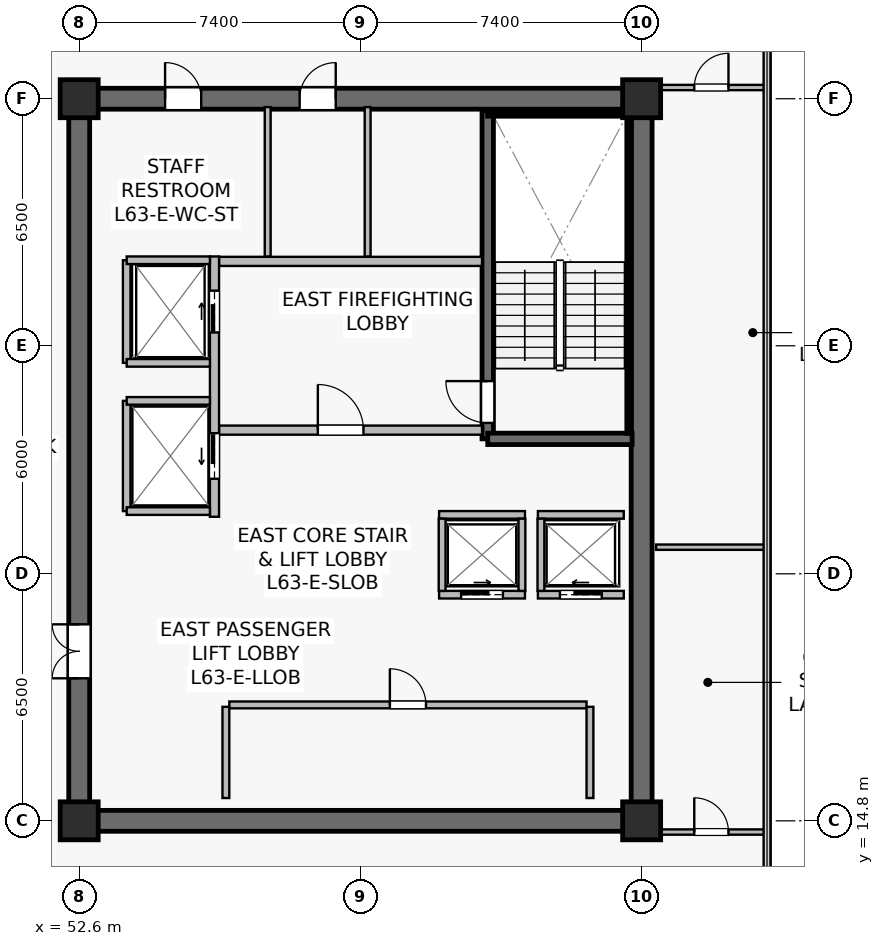
"""IFC4 building model, lengths in metres.
Left out: names, types, materials, properties, quantities, classifications, styles, units other than length and angle.
Written with IfcOpenShell. Run it as: python <this file> out.ifc"""

import sys

from ifc_helpers import new_model, si_unit, direction, frame, frame_2d, origin, origin_2d, place, context, subcontext, project, spatial, rectangle, extrude, source, transform, mapped, element, fill, save


model = new_model("IFC4")
c1 = context("Model", 3, precision=1e-05, world=origin(), true_north=direction((0.0, 1.0)))
c2 = subcontext(c1, "Body", "Model", "MODEL_VIEW")
j1 = project(units=[si_unit("LENGTHUNIT", "METRE"), si_unit("PLANEANGLEUNIT", "RADIAN")], contexts=[c1])
p1 = place(None, origin())
s1 = spatial("IfcSite", under=j1, at=p1, CompositionType="ELEMENT")
p2 = place(p1, origin())
s2 = spatial("IfcBuilding", under=s1, at=p2, CompositionType="ELEMENT")
p3 = place(p2, frame((0.0, 0.0, 262.9)))
s3 = spatial("IfcBuildingStorey", under=s2, at=p3, CompositionType="ELEMENT", Elevation=262.9)
p4 = place(p3, frame((52.325, 14.8, 0.0), z_axis=(0.0, 0.0, 1.0), x_axis=(1.0, 0.0, 0.0)))
e1 = element("IfcWall", 1, at=p4, inside=s3, PredefinedType="SHEAR", context=c2, shape_type="SweptSolid", body=[
    extrude(rectangle(XDim=15.35, YDim=0.55, at=frame_2d((7.675, 0.0))), origin(), (0.0, 0.0, 1.0), 3.8),
])
p5 = place(p3, frame((52.325, 33.8, 0.0), z_axis=(0.0, 0.0, 1.0), x_axis=(1.0, 0.0, 0.0)))
e2 = element("IfcWall", 2, at=p5, inside=s3, PredefinedType="SHEAR", context=c2, shape_type="SweptSolid", body=[
    extrude(rectangle(XDim=15.35, YDim=0.55, at=frame_2d((7.675, 0.0))), origin(), (0.0, 0.0, 1.0), 3.8),
])
p6 = place(p5, frame((6.075, 0.0, 0.0)))
e3 = element("IfcOpeningElement", 3, at=p6, cuts=e2, PredefinedType="OPENING", context=c2, shape_type="SweptSolid", body=[
    extrude(rectangle(XDim=0.95, YDim=2.15, at=frame_2d((0.475, 1.075))), frame((0.0, 0.285, 0.0), z_axis=(0.0, -1.0, 0.0), x_axis=(1.0, 0.0, 0.0)), (0.0, 0.0, 1.0), 0.57),
])
p7 = place(p5, frame((2.535, 0.0, 0.0)))
e4 = element("IfcOpeningElement", 4, at=p7, cuts=e2, PredefinedType="OPENING", context=c2, shape_type="SweptSolid", body=[
    extrude(rectangle(XDim=0.95, YDim=2.15, at=frame_2d((0.475, 1.075))), frame((0.0, 0.285, 0.0), z_axis=(0.0, -1.0, 0.0), x_axis=(1.0, 0.0, 0.0)), (0.0, 0.0, 1.0), 0.57),
])
p8 = place(p3, frame((52.6, 15.075, 0.0), z_axis=(0.0, 0.0, 1.0), x_axis=(0.0, 1.0, 0.0)))
e5 = element("IfcWall", 5, at=p8, inside=s3, PredefinedType="SHEAR", context=c2, shape_type="SweptSolid", body=[
    extrude(rectangle(XDim=18.45, YDim=0.55, at=frame_2d((9.225, 0.0))), origin(), (0.0, 0.0, 1.0), 3.8),
])
p9 = place(p8, frame((3.475, 0.0, 0.0)))
e6 = element("IfcOpeningElement", 6, at=p9, cuts=e5, PredefinedType="OPENING", context=c2, shape_type="SweptSolid", body=[
    extrude(rectangle(XDim=1.42, YDim=2.2, at=frame_2d((0.71, 1.1))), frame((0.0, 0.285, 0.0), z_axis=(0.0, -1.0, 0.0), x_axis=(1.0, 0.0, 0.0)), (0.0, 0.0, 1.0), 0.57),
])
p10 = place(p3, frame((67.4, 15.075, 0.0), z_axis=(0.0, 0.0, 1.0), x_axis=(0.0, 1.0, 0.0)))
e7 = element("IfcWall", 7, at=p10, inside=s3, PredefinedType="SHEAR", context=c2, shape_type="SweptSolid", body=[
    extrude(rectangle(XDim=18.45, YDim=0.55, at=frame_2d((9.225, 0.0))), origin(), (0.0, 0.0, 1.0), 3.8),
])
p11 = place(p3, frame((63.35, 24.85, 0.0), z_axis=(0.0, 0.0, 1.0), x_axis=(0.0, 1.0, 0.0)))
e8 = element("IfcWall", 8, at=p11, inside=s3, PredefinedType="SHEAR", context=c2, shape_type="SweptSolid", body=[
    extrude(rectangle(XDim=8.63, YDim=0.3, at=frame_2d((4.315, 0.0))), origin(), (0.0, 0.0, 1.0), 3.8),
])
p12 = place(p11, frame((0.42, 0.0, 0.0)))
e9 = element("IfcOpeningElement", 9, at=p12, cuts=e8, PredefinedType="OPENING", context=c2, shape_type="SweptSolid", body=[
    extrude(rectangle(XDim=1.1, YDim=2.15, at=frame_2d((0.55, 1.075))), frame((0.0, 0.16, 0.0), z_axis=(0.0, -1.0, 0.0), x_axis=(1.0, 0.0, 0.0)), (0.0, 0.0, 1.0), 0.32),
])
p13 = place(p3, frame((63.35, 24.85, 0.0), z_axis=(0.0, 0.0, 1.0), x_axis=(1.0, 0.0, 0.0)))
e10 = element("IfcWall", 10, at=p13, inside=s3, PredefinedType="SHEAR", context=c2, shape_type="SweptSolid", body=[
    extrude(rectangle(XDim=3.8, YDim=0.3, at=frame_2d((1.9, 0.0))), origin(), (0.0, 0.0, 1.0), 3.8),
])
p14 = place(p3, frame((63.35, 33.4, 0.0), z_axis=(0.0, 0.0, 1.0), x_axis=(1.0, 0.0, 0.0)))
e11 = element("IfcWall", 11, at=p14, inside=s3, PredefinedType="SOLIDWALL", context=c2, shape_type="SweptSolid", body=[
    extrude(rectangle(XDim=3.72, YDim=0.12, at=frame_2d((1.86, 0.0))), origin(), (0.0, 0.0, 1.0), 3.8),
])
p15 = place(p3, frame((67.07, 25.0, 0.0), z_axis=(0.0, 0.0, 1.0), x_axis=(0.0, 1.0, 0.0)))
e12 = element("IfcWall", 12, at=p15, inside=s3, PredefinedType="SOLIDWALL", context=c2, shape_type="SweptSolid", body=[
    extrude(rectangle(XDim=8.32, YDim=0.12, at=frame_2d((4.16, 0.0))), origin(), (0.0, 0.0, 1.0), 3.8),
])
m1 = source(origin(), c2, "Body", "SweptSolid", [
    extrude(rectangle(XDim=1.0, YDim=1.0, at=origin_2d()), origin(), (0.0, 0.0, 1.0), 4.1),
])
for number, where, z_axis, x_axis in (
    (13, (52.6, 14.8, 0.0), (0.0, 0.0, 1.0), (1.0, 0.0, 0.0)),
    (14, (67.4, 14.8, 0.0), (0.0, 0.0, 1.0), (1.0, 0.0, 0.0)),
    (15, (52.6, 33.8, 0.0), (0.0, 0.0, 1.0), (1.0, 0.0, 0.0)),
    (16, (67.4, 33.8, 0.0), (0.0, 0.0, 1.0), (1.0, 0.0, 0.0)),
):
    element("IfcColumn", number, at=place(p3, frame(where, z_axis=z_axis, x_axis=x_axis)), inside=s3, PredefinedType="COLUMN", context=c2, shape_type="MappedRepresentation", body=[
        mapped(m1, transform((0.0, 0.0, 0.0), scale=1.0)),
    ])
p16 = place(p3, frame((56.28, 25.08, 0.0), z_axis=(0.0, 0.0, 1.0), x_axis=(1.0, 0.0, 0.0)))
e17 = element("IfcWall", 17, at=p16, inside=s3, PredefinedType="SOLIDWALL", context=c2, shape_type="SweptSolid", body=[
    extrude(rectangle(XDim=6.92, YDim=0.24, at=frame_2d((3.46, 0.0))), origin(), (0.0, 0.0, 1.0), 3.197),
])
p17 = place(p16, frame((2.6, 0.0, 0.0)))
e18 = element("IfcOpeningElement", 18, at=p17, cuts=e17, PredefinedType="OPENING", context=c2, shape_type="SweptSolid", body=[
    extrude(rectangle(XDim=1.2, YDim=2.16, at=frame_2d((0.6, 1.08))), frame((0.0, 0.13, 0.0), z_axis=(0.0, -1.0, 0.0), x_axis=(1.0, 0.0, 0.0)), (0.0, 0.0, 1.0), 0.26),
])
p18 = place(p3, frame((56.28, 29.52, 0.0), z_axis=(0.0, 0.0, 1.0), x_axis=(1.0, 0.0, 0.0)))
e19 = element("IfcWall", 19, at=p18, inside=s3, PredefinedType="SOLIDWALL", context=c2, shape_type="SweptSolid", body=[
    extrude(rectangle(XDim=6.92, YDim=0.24, at=frame_2d((3.46, 0.0))), origin(), (0.0, 0.0, 1.0), 3.197),
])
p19 = place(p3, frame((56.16, 22.8, 0.0), z_axis=(0.0, 0.0, 1.0), x_axis=(0.0, 1.0, 0.0)))
e20 = element("IfcWall", 20, at=p19, inside=s3, PredefinedType="SOLIDWALL", context=c2, shape_type="SweptSolid", body=[
    extrude(rectangle(XDim=6.85, YDim=0.24, at=frame_2d((3.425, 0.0))), origin(), (0.0, 0.0, 1.0), 2.935),
])
p20 = place(p19, frame((4.85, 0.0, 0.0)))
e21 = element("IfcOpeningElement", 21, at=p20, cuts=e20, PredefinedType="OPENING", context=c2, shape_type="SweptSolid", body=[
    extrude(rectangle(XDim=1.1, YDim=2.22, at=frame_2d((0.55, 1.11))), frame((0.0, 0.13, 0.0), z_axis=(0.0, -1.0, 0.0), x_axis=(1.0, 0.0, 0.0)), (0.0, 0.0, 1.0), 0.26),
])
p21 = place(p19, frame((1.0, 0.0, 0.0)))
e22 = element("IfcOpeningElement", 22, at=p21, cuts=e20, PredefinedType="OPENING", context=c2, shape_type="SweptSolid", body=[
    extrude(rectangle(XDim=1.2, YDim=2.22, at=frame_2d((0.6, 1.11))), frame((0.0, 0.13, 0.0), z_axis=(0.0, -1.0, 0.0), x_axis=(1.0, 0.0, 0.0)), (0.0, 0.0, 1.0), 0.26),
])
p22 = place(p3, frame((64.67, 20.75, 0.0), z_axis=(0.0, 0.0, 1.0), x_axis=(1.0, 0.0, 0.0)))
e23 = element("IfcWall", 23, at=p22, inside=s3, PredefinedType="SOLIDWALL", context=c2, shape_type="SweptSolid", body=[
    extrude(rectangle(XDim=2.26, YDim=0.2, at=frame_2d((1.13, 0.0))), origin(), (0.0, 0.0, 1.0), 3.8),
])
p23 = place(p22, frame((0.58, 0.0, 0.0)))
e24 = element("IfcOpeningElement", 24, at=p23, cuts=e23, PredefinedType="OPENING", context=c2, shape_type="SweptSolid", body=[
    extrude(rectangle(XDim=1.1, YDim=2.22, at=frame_2d((0.55, 1.11))), frame((0.0, 0.11, 0.0), z_axis=(0.0, -1.0, 0.0), x_axis=(1.0, 0.0, 0.0)), (0.0, 0.0, 1.0), 0.22),
])
p24 = place(p3, frame((64.67, 22.85, 0.0), z_axis=(0.0, 0.0, 1.0), x_axis=(1.0, 0.0, 0.0)))
e25 = element("IfcWall", 25, at=p24, inside=s3, PredefinedType="SOLIDWALL", context=c2, shape_type="SweptSolid", body=[
    extrude(rectangle(XDim=2.26, YDim=0.2, at=frame_2d((1.13, 0.0))), origin(), (0.0, 0.0, 1.0), 3.8),
])
p25 = place(p3, frame((64.75, 20.85, 0.0), z_axis=(0.0, 0.0, 1.0), x_axis=(0.0, 1.0, 0.0)))
e26 = element("IfcWall", 26, at=p25, inside=s3, PredefinedType="SOLIDWALL", context=c2, shape_type="SweptSolid", body=[
    extrude(rectangle(XDim=1.9, YDim=0.18, at=frame_2d((0.95, 0.0))), origin(), (0.0, 0.0, 1.0), 3.8),
])
p26 = place(p3, frame((62.07, 20.75, 0.0), z_axis=(0.0, 0.0, 1.0), x_axis=(1.0, 0.0, 0.0)))
e27 = element("IfcWall", 27, at=p26, inside=s3, PredefinedType="SOLIDWALL", context=c2, shape_type="SweptSolid", body=[
    extrude(rectangle(XDim=2.26, YDim=0.2, at=frame_2d((1.13, 0.0))), origin(), (0.0, 0.0, 1.0), 3.8),
])
p27 = place(p26, frame((0.58, 0.0, 0.0)))
e28 = element("IfcOpeningElement", 28, at=p27, cuts=e27, PredefinedType="OPENING", context=c2, shape_type="SweptSolid", body=[
    extrude(rectangle(XDim=1.1, YDim=2.22, at=frame_2d((0.55, 1.11))), frame((0.0, 0.11, 0.0), z_axis=(0.0, -1.0, 0.0), x_axis=(1.0, 0.0, 0.0)), (0.0, 0.0, 1.0), 0.22),
])
p28 = place(p3, frame((62.07, 22.85, 0.0), z_axis=(0.0, 0.0, 1.0), x_axis=(1.0, 0.0, 0.0)))
e29 = element("IfcWall", 29, at=p28, inside=s3, PredefinedType="SOLIDWALL", context=c2, shape_type="SweptSolid", body=[
    extrude(rectangle(XDim=2.26, YDim=0.2, at=frame_2d((1.13, 0.0))), origin(), (0.0, 0.0, 1.0), 3.8),
])
for number, where, z_axis, x_axis in (
    (30, (62.15, 20.85, 0.0), (0.0, 0.0, 1.0), (0.0, 1.0, 0.0)),
    (31, (64.25, 20.85, 0.0), (0.0, 0.0, 1.0), (0.0, 1.0, 0.0)),
):
    element("IfcWall", number, at=place(p3, frame(where, z_axis=z_axis, x_axis=x_axis)), inside=s3, PredefinedType="SOLIDWALL", context=c2, shape_type="SweptSolid", body=[
        extrude(rectangle(XDim=1.9, YDim=0.18, at=frame_2d((0.95, 0.0))), origin(), (0.0, 0.0, 1.0), 3.8),
    ])
p29 = place(p3, frame((53.85, 26.85, 0.0), z_axis=(0.0, 0.0, 1.0), x_axis=(0.0, 1.0, 0.0)))
e32 = element("IfcWall", 32, at=p29, inside=s3, PredefinedType="SOLIDWALL", context=c2, shape_type="SweptSolid", body=[
    extrude(rectangle(XDim=2.7, YDim=0.2, at=frame_2d((1.35, 0.0))), origin(), (0.0, 0.0, 1.0), 3.8),
])
p30 = place(p3, frame((53.85, 29.55, 0.0), z_axis=(0.0, 0.0, 1.0), x_axis=(1.0, 0.0, 0.0)))
e33 = element("IfcWall", 33, at=p30, inside=s3, PredefinedType="SOLIDWALL", context=c2, shape_type="SweptSolid", body=[
    extrude(rectangle(XDim=2.19, YDim=0.2, at=frame_2d((1.095, 0.0))), origin(), (0.0, 0.0, 1.0), 3.8),
])
p31 = place(p3, frame((53.85, 26.85, 0.0), z_axis=(0.0, 0.0, 1.0), x_axis=(1.0, 0.0, 0.0)))
e34 = element("IfcWall", 34, at=p31, inside=s3, PredefinedType="SOLIDWALL", context=c2, shape_type="SweptSolid", body=[
    extrude(rectangle(XDim=2.19, YDim=0.2, at=frame_2d((1.095, 0.0))), origin(), (0.0, 0.0, 1.0), 3.197),
])
p32 = place(p3, frame((53.85, 22.95, 0.0), z_axis=(0.0, 0.0, 1.0), x_axis=(0.0, 1.0, 0.0)))
e35 = element("IfcWall", 35, at=p32, inside=s3, PredefinedType="SOLIDWALL", context=c2, shape_type="SweptSolid", body=[
    extrude(rectangle(XDim=2.9, YDim=0.2, at=frame_2d((1.45, 0.0))), origin(), (0.0, 0.0, 1.0), 2.935),
])
for number, where, z_axis, x_axis in (
    (36, (53.85, 25.85, 0.0), (0.0, 0.0, 1.0), (1.0, 0.0, 0.0)),
    (37, (53.85, 22.95, 0.0), (0.0, 0.0, 1.0), (1.0, 0.0, 0.0)),
):
    element("IfcWall", number, at=place(p3, frame(where, z_axis=z_axis, x_axis=x_axis)), inside=s3, PredefinedType="SOLIDWALL", context=c2, shape_type="SweptSolid", body=[
        extrude(rectangle(XDim=2.19, YDim=0.2, at=frame_2d((1.095, 0.0))), origin(), (0.0, 0.0, 1.0), 3.8),
    ])
p33 = place(p3, frame((56.55, 17.85, 0.0), z_axis=(0.0, 0.0, 1.0), x_axis=(1.0, 0.0, 0.0)))
e38 = element("IfcWall", 38, at=p33, inside=s3, PredefinedType="SOLIDWALL", context=c2, shape_type="SweptSolid", body=[
    extrude(rectangle(XDim=9.4, YDim=0.18, at=frame_2d((4.7, 0.0))), origin(), (0.0, 0.0, 1.0), 3.197),
])
p34 = place(p33, frame((4.225, 0.0, 0.0)))
e39 = element("IfcOpeningElement", 39, at=p34, cuts=e38, PredefinedType="OPENING", context=c2, shape_type="SweptSolid", body=[
    extrude(rectangle(XDim=0.95, YDim=2.15, at=frame_2d((0.475, 1.075))), frame((0.0, 0.1, 0.0), z_axis=(0.0, -1.0, 0.0), x_axis=(1.0, 0.0, 0.0)), (0.0, 0.0, 1.0), 0.2),
])
for number, where, z_axis, x_axis in (
    (40, (56.46, 15.4, 0.0), (0.0, 0.0, 1.0), (0.0, 1.0, 0.0)),
    (41, (66.04, 15.4, 0.0), (0.0, 0.0, 1.0), (0.0, 1.0, 0.0)),
):
    element("IfcWall", number, at=place(p3, frame(where, z_axis=z_axis, x_axis=x_axis)), inside=s3, PredefinedType="SOLIDWALL", context=c2, shape_type="SweptSolid", body=[
        extrude(rectangle(XDim=2.4, YDim=0.18, at=frame_2d((1.2, 0.0))), origin(), (0.0, 0.0, 1.0), 3.8),
    ])
p35 = place(p3, frame((60.19, 29.65, 0.0), z_axis=(0.0, 0.0, 1.0), x_axis=(0.0, 1.0, 0.0)))
e42 = element("IfcWall", 42, at=p35, inside=s3, PredefinedType="PLUMBINGWALL", context=c2, shape_type="SweptSolid", body=[
    extrude(rectangle(XDim=3.93, YDim=0.155, at=frame_2d((1.965, 0.0))), origin(), (0.0, 0.0, 1.0), 3.197),
])
p36 = place(p3, frame((57.56, 29.65, 0.0), z_axis=(0.0, 0.0, 1.0), x_axis=(0.0, 1.0, 0.0)))
e43 = element("IfcWall", 43, at=p36, inside=s3, PredefinedType="PLUMBINGWALL", context=c2, shape_type="SweptSolid", body=[
    extrude(rectangle(XDim=3.93, YDim=0.155, at=frame_2d((1.965, 0.0))), origin(), (0.0, 0.0, 1.0), 3.8),
])
p37 = place(p3, frame((67.78, 22.0, 0.0), z_axis=(0.0, 0.0, 1.0), x_axis=(1.0, 0.0, 0.0)))
e44 = element("IfcWall", 44, at=p37, inside=s3, PredefinedType="PARTITIONING", context=c2, shape_type="SweptSolid", body=[
    extrude(rectangle(XDim=2.91, YDim=0.14, at=frame_2d((1.455, 0.0))), origin(), (0.0, 0.0, 1.0), 3.8),
])
p38 = place(p3, frame((67.78, 14.505, 0.0), z_axis=(0.0, 0.0, 1.0), x_axis=(1.0, 0.0, 0.0)))
e45 = element("IfcWall", 45, at=p38, inside=s3, PredefinedType="PARTITIONING", context=c2, shape_type="SweptSolid", body=[
    extrude(rectangle(XDim=2.91, YDim=0.14, at=frame_2d((1.455, 0.0))), origin(), (0.0, 0.0, 1.0), 3.8),
])
p39 = place(p38, frame((1.005, 0.0, 0.0)))
e46 = element("IfcOpeningElement", 46, at=p39, cuts=e45, PredefinedType="OPENING", context=c2, shape_type="SweptSolid", body=[
    extrude(rectangle(XDim=0.9, YDim=2.1, at=frame_2d((0.45, 1.05))), frame((0.0, 0.08, 0.0), z_axis=(0.0, -1.0, 0.0), x_axis=(1.0, 0.0, 0.0)), (0.0, 0.0, 1.0), 0.16),
])
p40 = place(p3, frame((67.78, 34.095, 0.0), z_axis=(0.0, 0.0, 1.0), x_axis=(1.0, 0.0, 0.0)))
e47 = element("IfcWall", 47, at=p40, inside=s3, PredefinedType="PARTITIONING", context=c2, shape_type="SweptSolid", body=[
    extrude(rectangle(XDim=2.91, YDim=0.14, at=frame_2d((1.455, 0.0))), origin(), (0.0, 0.0, 1.0), 3.8),
])
p41 = place(p40, frame((1.005, 0.0, 0.0)))
e48 = element("IfcOpeningElement", 48, at=p41, cuts=e47, PredefinedType="OPENING", context=c2, shape_type="SweptSolid", body=[
    extrude(rectangle(XDim=0.9, YDim=2.1, at=frame_2d((0.45, 1.05))), frame((0.0, 0.08, 0.0), z_axis=(0.0, -1.0, 0.0), x_axis=(1.0, 0.0, 0.0)), (0.0, 0.0, 1.0), 0.16),
])
m2 = source(origin(), c2, "Body", "SweptSolid", [
    extrude(rectangle(XDim=1.1, YDim=2.15, at=frame_2d((0.55, 1.075))), frame((0.0, 0.025, 0.0), z_axis=(0.0, -1.0, 0.0), x_axis=(1.0, 0.0, 0.0)), (0.0, 0.0, 1.0), 0.05),
])
p42 = place(p12, origin())
e49 = element("IfcDoor", 49, at=p42, inside=s3, OperationType="SINGLE_SWING_RIGHT", PredefinedType="DOOR", context=c2, shape_type="MappedRepresentation", body=[
    mapped(m2, transform((0.0, 0.0, 0.0), scale=1.0)),
])
fill(e9, e49)
m3 = source(origin(), c2, "Body", "SweptSolid", [
    extrude(rectangle(XDim=1.2, YDim=2.16, at=frame_2d((0.6, 1.08))), frame((0.0, 0.025, 0.0), z_axis=(0.0, -1.0, 0.0), x_axis=(1.0, 0.0, 0.0)), (0.0, 0.0, 1.0), 0.05),
])
p43 = place(p17, origin())
e50 = element("IfcDoor", 50, at=p43, inside=s3, OperationType="SINGLE_SWING_LEFT", PredefinedType="DOOR", context=c2, shape_type="MappedRepresentation", body=[
    mapped(m3, transform((0.0, 0.0, 0.0), scale=1.0)),
])
fill(e18, e50)
m4 = source(origin(), c2, "Body", "SweptSolid", [
    extrude(rectangle(XDim=1.1, YDim=2.22, at=frame_2d((0.55, 1.11))), frame((0.0, 0.025, 0.0), z_axis=(0.0, -1.0, 0.0), x_axis=(1.0, 0.0, 0.0)), (0.0, 0.0, 1.0), 0.05),
])
p44 = place(p23, origin())
e51 = element("IfcDoor", 51, at=p44, inside=s3, OperationType="SLIDING_TO_LEFT", PredefinedType="USERDEFINED", context=c2, shape_type="MappedRepresentation", body=[
    mapped(m4, transform((0.0, 0.0, 0.0), scale=1.0)),
])
fill(e24, e51)
p45 = place(p27, origin())
e52 = element("IfcDoor", 52, at=p45, inside=s3, OperationType="SLIDING_TO_RIGHT", PredefinedType="USERDEFINED", context=c2, shape_type="MappedRepresentation", body=[
    mapped(m4, transform((0.0, 0.0, 0.0), scale=1.0)),
])
fill(e28, e52)
p46 = place(p20, origin())
e53 = element("IfcDoor", 53, at=p46, inside=s3, OperationType="SLIDING_TO_RIGHT", PredefinedType="USERDEFINED", context=c2, shape_type="MappedRepresentation", body=[
    mapped(m4, transform((0.0, 0.0, 0.0), scale=1.0)),
])
fill(e21, e53)
m5 = source(origin(), c2, "Body", "SweptSolid", [
    extrude(rectangle(XDim=1.2, YDim=2.22, at=frame_2d((0.6, 1.11))), frame((0.0, 0.025, 0.0), z_axis=(0.0, -1.0, 0.0), x_axis=(1.0, 0.0, 0.0)), (0.0, 0.0, 1.0), 0.05),
])
p47 = place(p21, origin())
e54 = element("IfcDoor", 54, at=p47, inside=s3, OperationType="SLIDING_TO_LEFT", PredefinedType="USERDEFINED", context=c2, shape_type="MappedRepresentation", body=[
    mapped(m5, transform((0.0, 0.0, 0.0), scale=1.0)),
])
fill(e22, e54)
m6 = source(origin(), c2, "Body", "SweptSolid", [
    extrude(rectangle(XDim=0.95, YDim=2.15, at=frame_2d((0.475, 1.075))), frame((0.0, 0.025, 0.0), z_axis=(0.0, -1.0, 0.0), x_axis=(1.0, 0.0, 0.0)), (0.0, 0.0, 1.0), 0.05),
])
p48 = place(p34, origin())
e55 = element("IfcDoor", 55, at=p48, inside=s3, OperationType="SINGLE_SWING_LEFT", PredefinedType="DOOR", context=c2, shape_type="MappedRepresentation", body=[
    mapped(m6, transform((0.0, 0.0, 0.0), scale=1.0)),
])
fill(e39, e55)
m7 = source(origin(), c2, "Body", "SweptSolid", [
    extrude(rectangle(XDim=1.42, YDim=2.2, at=frame_2d((0.71, 1.1))), frame((0.0, 0.025, 0.0), z_axis=(0.0, -1.0, 0.0), x_axis=(1.0, 0.0, 0.0)), (0.0, 0.0, 1.0), 0.05),
])
p49 = place(p9, origin())
e56 = element("IfcDoor", 56, at=p49, inside=s3, OperationType="DOUBLE_DOOR_SINGLE_SWING", PredefinedType="DOOR", context=c2, shape_type="MappedRepresentation", body=[
    mapped(m7, transform((0.0, 0.0, 0.0), scale=1.0)),
])
fill(e6, e56)
p50 = place(p6, origin())
e57 = element("IfcDoor", 57, at=p50, inside=s3, OperationType="SINGLE_SWING_RIGHT", PredefinedType="DOOR", context=c2, shape_type="MappedRepresentation", body=[
    mapped(m6, transform((0.0, 0.0, 0.0), scale=1.0)),
])
fill(e3, e57)
p51 = place(p7, origin())
e58 = element("IfcDoor", 58, at=p51, inside=s3, OperationType="SINGLE_SWING_LEFT", PredefinedType="DOOR", context=c2, shape_type="MappedRepresentation", body=[
    mapped(m6, transform((0.0, 0.0, 0.0), scale=1.0)),
])
fill(e4, e58)
m8 = source(origin(), c2, "Body", "SweptSolid", [
    extrude(rectangle(XDim=0.9, YDim=2.1, at=frame_2d((0.45, 1.05))), frame((0.0, 0.025, 0.0), z_axis=(0.0, -1.0, 0.0), x_axis=(1.0, 0.0, 0.0)), (0.0, 0.0, 1.0), 0.05),
])
p52 = place(p39, origin())
e59 = element("IfcDoor", 59, at=p52, inside=s3, OperationType="SINGLE_SWING_LEFT", PredefinedType="DOOR", context=c2, shape_type="MappedRepresentation", body=[
    mapped(m8, transform((0.0, 0.0, 0.0), scale=1.0)),
])
fill(e46, e59)
p53 = place(p41, origin())
e60 = element("IfcDoor", 60, at=p53, inside=s3, OperationType="SINGLE_SWING_RIGHT", PredefinedType="DOOR", context=c2, shape_type="MappedRepresentation", body=[
    mapped(m8, transform((0.0, 0.0, 0.0), scale=1.0)),
])
fill(e48, e60)
save(model, sys.argv[1])
